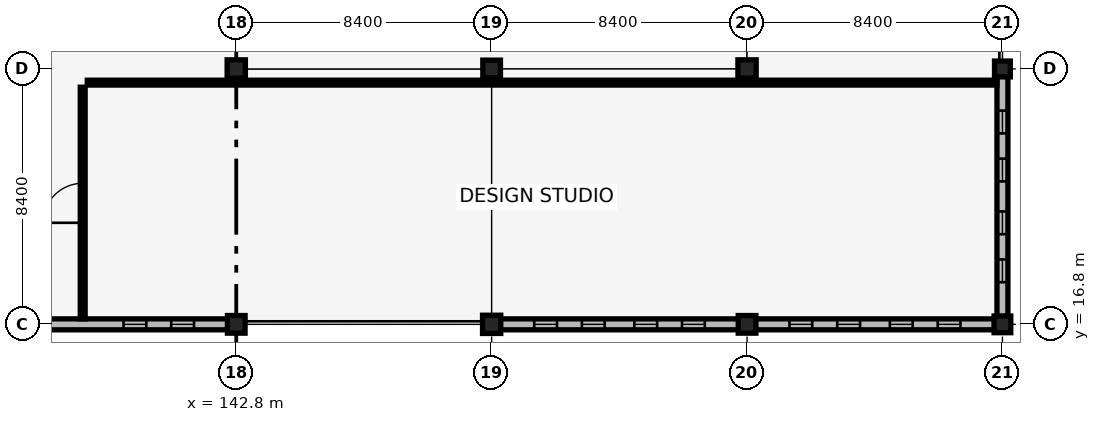
"""IFC4 building model, lengths in metres.
Left out: names, types, materials, properties, quantities, classifications, styles, units other than length and angle.
Written with IfcOpenShell. Run it as: python <this file> out.ifc"""

import sys

from ifc_helpers import new_model, si_unit, direction, frame, frame_2d, origin, origin_2d, place, context, subcontext, project, spatial, rectangle, extrude, element, fill, save


model = new_model("IFC4")
c1 = context("Model", 3, precision=1e-05, world=origin(), true_north=direction((0.0, 1.0)))
c2 = subcontext(c1, "Body", "Model", "MODEL_VIEW")
j1 = project(units=[si_unit("LENGTHUNIT", "METRE"), si_unit("PLANEANGLEUNIT", "RADIAN")], contexts=[c1])
p1 = place(None, origin())
s1 = spatial("IfcSite", under=j1, at=p1, CompositionType="ELEMENT")
p2 = place(p1, origin())
s2 = spatial("IfcBuilding", under=s1, at=p2, CompositionType="ELEMENT")
p3 = place(p2, frame((0.0, 0.0, 18.02)))
s3 = spatial("IfcBuildingStorey", under=s2, at=p3, CompositionType="ELEMENT", Elevation=18.02)
p4 = place(p3, frame((142.8, 16.8, 0.0), z_axis=(0.0, 0.0, 1.0), x_axis=(1.0, 0.0, 0.0)))
e1 = element("IfcColumn", 1, at=p4, inside=s3, PredefinedType="COLUMN", context=c2, shape_type="SweptSolid", body=[
    extrude(rectangle(XDim=0.58, YDim=0.58, at=origin_2d()), origin(), (0.0, 0.0, 1.0), 3.78),
])
for number, where, z_axis, x_axis in (
    (2, (142.8, 25.2, 0.0), (0.0, 0.0, 1.0), (1.0, 0.0, 0.0)),
    (3, (151.2, 16.8, 0.0), (0.0, 0.0, 1.0), (1.0, 0.0, 0.0)),
):
    element("IfcColumn", number, at=place(p3, frame(where, z_axis=z_axis, x_axis=x_axis)), inside=s3, PredefinedType="COLUMN", context=c2, shape_type="SweptSolid", body=[
        extrude(rectangle(XDim=0.6, YDim=0.6, at=origin_2d()), origin(), (0.0, 0.0, 1.0), 3.78),
    ])
for number, where, z_axis, x_axis in (
    (4, (151.2, 25.2, 0.0), (0.0, 0.0, 1.0), (1.0, 0.0, 0.0)),
    (5, (159.6, 16.8, 0.0), (0.0, 0.0, 1.0), (1.0, 0.0, 0.0)),
):
    element("IfcColumn", number, at=place(p3, frame(where, z_axis=z_axis, x_axis=x_axis)), inside=s3, PredefinedType="COLUMN", context=c2, shape_type="SweptSolid", body=[
        extrude(rectangle(XDim=0.58, YDim=0.58, at=origin_2d()), origin(), (0.0, 0.0, 1.0), 3.78),
    ])
p5 = place(p3, frame((159.6, 25.2, 0.0), z_axis=(0.0, 0.0, 1.0), x_axis=(1.0, 0.0, 0.0)))
e6 = element("IfcColumn", 6, at=p5, inside=s3, PredefinedType="COLUMN", context=c2, shape_type="SweptSolid", body=[
    extrude(rectangle(XDim=0.6, YDim=0.6, at=origin_2d()), origin(), (0.0, 0.0, 1.0), 3.78),
])
p6 = place(p3, frame((168.0, 16.8, 0.0), z_axis=(0.0, 0.0, 1.0), x_axis=(1.0, 0.0, 0.0)))
e7 = element("IfcColumn", 7, at=p6, inside=s3, PredefinedType="COLUMN", context=c2, shape_type="SweptSolid", body=[
    extrude(rectangle(XDim=0.55, YDim=0.55, at=origin_2d()), origin(), (0.0, 0.0, 1.0), 3.78),
])
p7 = place(p3, frame((168.0, 25.2, 0.0), z_axis=(0.0, 0.0, 1.0), x_axis=(1.0, 0.0, 0.0)))
e8 = element("IfcColumn", 8, at=p7, inside=s3, PredefinedType="COLUMN", context=c2, shape_type="SweptSolid", body=[
    extrude(rectangle(XDim=0.52, YDim=0.52, at=origin_2d()), origin(), (0.0, 0.0, 1.0), 3.78),
])
p8 = place(p3, frame((134.685, 16.8, 0.0), z_axis=(0.0, 0.0, 1.0), x_axis=(1.0, 0.0, 0.0)))
e9 = element("IfcWall", 9, at=p8, inside=s3, PredefinedType="SOLIDWALL", context=c2, shape_type="SweptSolid", body=[
    extrude(rectangle(XDim=7.84, YDim=0.36, at=frame_2d((3.92, 0.0))), origin(), (0.0, 0.0, 1.0), 3.18),
])
p9 = place(p8, frame((1.115, 0.0, 0.7)))
e10 = element("IfcOpeningElement", 10, at=p9, cuts=e9, PredefinedType="OPENING", context=c2, shape_type="SweptSolid", body=[
    extrude(rectangle(XDim=0.75, YDim=2.1, at=frame_2d((0.375, 1.05))), frame((0.0, 0.19, 0.0), z_axis=(0.0, -1.0, 0.0), x_axis=(1.0, 0.0, 0.0)), (0.0, 0.0, 1.0), 0.38),
])
p10 = place(p8, frame((4.407, 0.0, 0.7)))
e11 = element("IfcOpeningElement", 11, at=p10, cuts=e9, PredefinedType="OPENING", context=c2, shape_type="SweptSolid", body=[
    extrude(rectangle(XDim=0.75, YDim=2.1, at=frame_2d((0.375, 1.05))), frame((0.0, 0.19, 0.0), z_axis=(0.0, -1.0, 0.0), x_axis=(1.0, 0.0, 0.0)), (0.0, 0.0, 1.0), 0.38),
])
p11 = place(p8, frame((5.975, 0.0, 0.7)))
e12 = element("IfcOpeningElement", 12, at=p11, cuts=e9, PredefinedType="OPENING", context=c2, shape_type="SweptSolid", body=[
    extrude(rectangle(XDim=0.75, YDim=2.1, at=frame_2d((0.375, 1.05))), frame((0.0, 0.19, 0.0), z_axis=(0.0, -1.0, 0.0), x_axis=(1.0, 0.0, 0.0)), (0.0, 0.0, 1.0), 0.38),
])
p12 = place(p3, frame((151.485, 16.8, 0.0), z_axis=(0.0, 0.0, 1.0), x_axis=(1.0, 0.0, 0.0)))
e13 = element("IfcWall", 13, at=p12, inside=s3, PredefinedType="SOLIDWALL", context=c2, shape_type="SweptSolid", body=[
    extrude(rectangle(XDim=7.84, YDim=0.36, at=frame_2d((3.92, 0.0))), origin(), (0.0, 0.0, 1.0), 3.18),
])
p13 = place(p12, frame((1.115, 0.0, 0.7)))
e14 = element("IfcOpeningElement", 14, at=p13, cuts=e13, PredefinedType="OPENING", context=c2, shape_type="SweptSolid", body=[
    extrude(rectangle(XDim=0.75, YDim=2.1, at=frame_2d((0.375, 1.05))), frame((0.0, 0.19, 0.0), z_axis=(0.0, -1.0, 0.0), x_axis=(1.0, 0.0, 0.0)), (0.0, 0.0, 1.0), 0.38),
])
p14 = place(p12, frame((2.683, 0.0, 0.7)))
e15 = element("IfcOpeningElement", 15, at=p14, cuts=e13, PredefinedType="OPENING", context=c2, shape_type="SweptSolid", body=[
    extrude(rectangle(XDim=0.75, YDim=2.1, at=frame_2d((0.375, 1.05))), frame((0.0, 0.19, 0.0), z_axis=(0.0, -1.0, 0.0), x_axis=(1.0, 0.0, 0.0)), (0.0, 0.0, 1.0), 0.38),
])
p15 = place(p12, frame((4.407, 0.0, 0.7)))
e16 = element("IfcOpeningElement", 16, at=p15, cuts=e13, PredefinedType="OPENING", context=c2, shape_type="SweptSolid", body=[
    extrude(rectangle(XDim=0.75, YDim=2.1, at=frame_2d((0.375, 1.05))), frame((0.0, 0.19, 0.0), z_axis=(0.0, -1.0, 0.0), x_axis=(1.0, 0.0, 0.0)), (0.0, 0.0, 1.0), 0.38),
])
p16 = place(p12, frame((5.975, 0.0, 0.7)))
e17 = element("IfcOpeningElement", 17, at=p16, cuts=e13, PredefinedType="OPENING", context=c2, shape_type="SweptSolid", body=[
    extrude(rectangle(XDim=0.75, YDim=2.1, at=frame_2d((0.375, 1.05))), frame((0.0, 0.19, 0.0), z_axis=(0.0, -1.0, 0.0), x_axis=(1.0, 0.0, 0.0)), (0.0, 0.0, 1.0), 0.38),
])
p17 = place(p3, frame((159.875, 16.8, 0.0), z_axis=(0.0, 0.0, 1.0), x_axis=(1.0, 0.0, 0.0)))
e18 = element("IfcWall", 18, at=p17, inside=s3, PredefinedType="SOLIDWALL", context=c2, shape_type="SweptSolid", body=[
    extrude(rectangle(XDim=7.865, YDim=0.36, at=frame_2d((3.933, 0.0))), origin(), (0.0, 0.0, 1.0), 3.18),
])
p18 = place(p17, frame((1.119, 0.0, 0.7)))
e19 = element("IfcOpeningElement", 19, at=p18, cuts=e18, PredefinedType="OPENING", context=c2, shape_type="SweptSolid", body=[
    extrude(rectangle(XDim=0.75, YDim=2.1, at=frame_2d((0.375, 1.05))), frame((0.0, 0.19, 0.0), z_axis=(0.0, -1.0, 0.0), x_axis=(1.0, 0.0, 0.0)), (0.0, 0.0, 1.0), 0.38),
])
p19 = place(p17, frame((2.692, 0.0, 0.7)))
e20 = element("IfcOpeningElement", 20, at=p19, cuts=e18, PredefinedType="OPENING", context=c2, shape_type="SweptSolid", body=[
    extrude(rectangle(XDim=0.75, YDim=2.1, at=frame_2d((0.375, 1.05))), frame((0.0, 0.19, 0.0), z_axis=(0.0, -1.0, 0.0), x_axis=(1.0, 0.0, 0.0)), (0.0, 0.0, 1.0), 0.38),
])
p20 = place(p17, frame((4.423, 0.0, 0.7)))
e21 = element("IfcOpeningElement", 21, at=p20, cuts=e18, PredefinedType="OPENING", context=c2, shape_type="SweptSolid", body=[
    extrude(rectangle(XDim=0.75, YDim=2.1, at=frame_2d((0.375, 1.05))), frame((0.0, 0.19, 0.0), z_axis=(0.0, -1.0, 0.0), x_axis=(1.0, 0.0, 0.0)), (0.0, 0.0, 1.0), 0.38),
])
p21 = place(p17, frame((5.996, 0.0, 0.7)))
e22 = element("IfcOpeningElement", 22, at=p21, cuts=e18, PredefinedType="OPENING", context=c2, shape_type="SweptSolid", body=[
    extrude(rectangle(XDim=0.75, YDim=2.1, at=frame_2d((0.375, 1.05))), frame((0.0, 0.19, 0.0), z_axis=(0.0, -1.0, 0.0), x_axis=(1.0, 0.0, 0.0)), (0.0, 0.0, 1.0), 0.38),
])
p22 = place(p3, frame((168.0, 17.06, 0.0), z_axis=(0.0, 0.0, 1.0), x_axis=(0.0, 1.0, 0.0)))
e23 = element("IfcWall", 23, at=p22, inside=s3, PredefinedType="SOLIDWALL", context=c2, shape_type="SweptSolid", body=[
    extrude(rectangle(XDim=7.895, YDim=0.36, at=frame_2d((3.948, 0.0))), origin(), (0.0, 0.0, 1.0), 3.18),
])
p23 = place(p22, frame((1.125, 0.0, 0.7)))
e24 = element("IfcOpeningElement", 24, at=p23, cuts=e23, PredefinedType="OPENING", context=c2, shape_type="SweptSolid", body=[
    extrude(rectangle(XDim=0.75, YDim=2.1, at=frame_2d((0.375, 1.05))), frame((0.0, 0.19, 0.0), z_axis=(0.0, -1.0, 0.0), x_axis=(1.0, 0.0, 0.0)), (0.0, 0.0, 1.0), 0.38),
])
p24 = place(p22, frame((2.704, 0.0, 0.7)))
e25 = element("IfcOpeningElement", 25, at=p24, cuts=e23, PredefinedType="OPENING", context=c2, shape_type="SweptSolid", body=[
    extrude(rectangle(XDim=0.75, YDim=2.1, at=frame_2d((0.375, 1.05))), frame((0.0, 0.19, 0.0), z_axis=(0.0, -1.0, 0.0), x_axis=(1.0, 0.0, 0.0)), (0.0, 0.0, 1.0), 0.38),
])
p25 = place(p22, frame((4.441, 0.0, 0.7)))
e26 = element("IfcOpeningElement", 26, at=p25, cuts=e23, PredefinedType="OPENING", context=c2, shape_type="SweptSolid", body=[
    extrude(rectangle(XDim=0.75, YDim=2.1, at=frame_2d((0.375, 1.05))), frame((0.0, 0.19, 0.0), z_axis=(0.0, -1.0, 0.0), x_axis=(1.0, 0.0, 0.0)), (0.0, 0.0, 1.0), 0.38),
])
p26 = place(p22, frame((6.02, 0.0, 0.7)))
e27 = element("IfcOpeningElement", 27, at=p26, cuts=e23, PredefinedType="OPENING", context=c2, shape_type="SweptSolid", body=[
    extrude(rectangle(XDim=0.75, YDim=2.1, at=frame_2d((0.375, 1.05))), frame((0.0, 0.19, 0.0), z_axis=(0.0, -1.0, 0.0), x_axis=(1.0, 0.0, 0.0)), (0.0, 0.0, 1.0), 0.38),
])
p27 = place(p3, frame((137.75, 16.98, 0.0), z_axis=(0.0, 0.0, 1.0), x_axis=(0.0, 1.0, 0.0)))
e28 = element("IfcWall", 28, at=p27, inside=s3, PredefinedType="PARTITIONING", context=c2, shape_type="SweptSolid", body=[
    extrude(rectangle(XDim=7.62, YDim=0.16, at=frame_2d((3.81, 0.0))), origin(), (0.0, 0.0, 1.0), 3.18),
])
p28 = place(p27, frame((3.16, 0.0, 0.0)))
e29 = element("IfcOpeningElement", 29, at=p28, cuts=e28, PredefinedType="OPENING", context=c2, shape_type="SweptSolid", body=[
    extrude(rectangle(XDim=1.3, YDim=2.2, at=frame_2d((0.65, 1.1))), frame((0.0, 0.09, 0.0), z_axis=(0.0, -1.0, 0.0), x_axis=(1.0, 0.0, 0.0)), (0.0, 0.0, 1.0), 0.18),
])
p29 = place(p3, frame((137.9, 24.75, 0.0), z_axis=(0.0, 0.0, 1.0), x_axis=(1.0, 0.0, 0.0)))
e30 = element("IfcWall", 30, at=p29, inside=s3, PredefinedType="PARTITIONING", context=c2, shape_type="SweptSolid", body=[
    extrude(rectangle(XDim=29.92, YDim=0.16, at=frame_2d((14.96, 0.0))), origin(), (0.0, 0.0, 1.0), 3.13),
])
p30 = place(p10, origin())
e31 = element("IfcWindow", 31, at=p30, inside=s3, PartitioningType="DOUBLE_PANEL_VERTICAL", PredefinedType="WINDOW", context=c2, shape_type="SweptSolid", body=[
    extrude(rectangle(XDim=0.75, YDim=2.1, at=frame_2d((0.375, 1.05))), frame((0.0, 0.03, 0.0), z_axis=(0.0, -1.0, 0.0), x_axis=(1.0, 0.0, 0.0)), (0.0, 0.0, 1.0), 0.06),
])
fill(e11, e31)
p31 = place(p11, origin())
e32 = element("IfcWindow", 32, at=p31, inside=s3, PartitioningType="DOUBLE_PANEL_VERTICAL", PredefinedType="WINDOW", context=c2, shape_type="SweptSolid", body=[
    extrude(rectangle(XDim=0.75, YDim=2.1, at=frame_2d((0.375, 1.05))), frame((0.0, 0.03, 0.0), z_axis=(0.0, -1.0, 0.0), x_axis=(1.0, 0.0, 0.0)), (0.0, 0.0, 1.0), 0.06),
])
fill(e12, e32)
p32 = place(p13, origin())
e33 = element("IfcWindow", 33, at=p32, inside=s3, PartitioningType="DOUBLE_PANEL_VERTICAL", PredefinedType="WINDOW", context=c2, shape_type="SweptSolid", body=[
    extrude(rectangle(XDim=0.75, YDim=2.1, at=frame_2d((0.375, 1.05))), frame((0.0, 0.03, 0.0), z_axis=(0.0, -1.0, 0.0), x_axis=(1.0, 0.0, 0.0)), (0.0, 0.0, 1.0), 0.06),
])
fill(e14, e33)
p33 = place(p14, origin())
e34 = element("IfcWindow", 34, at=p33, inside=s3, PartitioningType="DOUBLE_PANEL_VERTICAL", PredefinedType="WINDOW", context=c2, shape_type="SweptSolid", body=[
    extrude(rectangle(XDim=0.75, YDim=2.1, at=frame_2d((0.375, 1.05))), frame((0.0, 0.03, 0.0), z_axis=(0.0, -1.0, 0.0), x_axis=(1.0, 0.0, 0.0)), (0.0, 0.0, 1.0), 0.06),
])
fill(e15, e34)
p34 = place(p15, origin())
e35 = element("IfcWindow", 35, at=p34, inside=s3, PartitioningType="DOUBLE_PANEL_VERTICAL", PredefinedType="WINDOW", context=c2, shape_type="SweptSolid", body=[
    extrude(rectangle(XDim=0.75, YDim=2.1, at=frame_2d((0.375, 1.05))), frame((0.0, 0.03, 0.0), z_axis=(0.0, -1.0, 0.0), x_axis=(1.0, 0.0, 0.0)), (0.0, 0.0, 1.0), 0.06),
])
fill(e16, e35)
p35 = place(p16, origin())
e36 = element("IfcWindow", 36, at=p35, inside=s3, PartitioningType="DOUBLE_PANEL_VERTICAL", PredefinedType="WINDOW", context=c2, shape_type="SweptSolid", body=[
    extrude(rectangle(XDim=0.75, YDim=2.1, at=frame_2d((0.375, 1.05))), frame((0.0, 0.03, 0.0), z_axis=(0.0, -1.0, 0.0), x_axis=(1.0, 0.0, 0.0)), (0.0, 0.0, 1.0), 0.06),
])
fill(e17, e36)
p36 = place(p18, origin())
e37 = element("IfcWindow", 37, at=p36, inside=s3, PartitioningType="DOUBLE_PANEL_VERTICAL", PredefinedType="WINDOW", context=c2, shape_type="SweptSolid", body=[
    extrude(rectangle(XDim=0.75, YDim=2.1, at=frame_2d((0.375, 1.05))), frame((0.0, 0.03, 0.0), z_axis=(0.0, -1.0, 0.0), x_axis=(1.0, 0.0, 0.0)), (0.0, 0.0, 1.0), 0.06),
])
fill(e19, e37)
p37 = place(p19, origin())
e38 = element("IfcWindow", 38, at=p37, inside=s3, PartitioningType="DOUBLE_PANEL_VERTICAL", PredefinedType="WINDOW", context=c2, shape_type="SweptSolid", body=[
    extrude(rectangle(XDim=0.75, YDim=2.1, at=frame_2d((0.375, 1.05))), frame((0.0, 0.03, 0.0), z_axis=(0.0, -1.0, 0.0), x_axis=(1.0, 0.0, 0.0)), (0.0, 0.0, 1.0), 0.06),
])
fill(e20, e38)
p38 = place(p20, origin())
e39 = element("IfcWindow", 39, at=p38, inside=s3, PartitioningType="DOUBLE_PANEL_VERTICAL", PredefinedType="WINDOW", context=c2, shape_type="SweptSolid", body=[
    extrude(rectangle(XDim=0.75, YDim=2.1, at=frame_2d((0.375, 1.05))), frame((0.0, 0.03, 0.0), z_axis=(0.0, -1.0, 0.0), x_axis=(1.0, 0.0, 0.0)), (0.0, 0.0, 1.0), 0.06),
])
fill(e21, e39)
p39 = place(p21, origin())
e40 = element("IfcWindow", 40, at=p39, inside=s3, PartitioningType="DOUBLE_PANEL_VERTICAL", PredefinedType="WINDOW", context=c2, shape_type="SweptSolid", body=[
    extrude(rectangle(XDim=0.75, YDim=2.1, at=frame_2d((0.375, 1.05))), frame((0.0, 0.03, 0.0), z_axis=(0.0, -1.0, 0.0), x_axis=(1.0, 0.0, 0.0)), (0.0, 0.0, 1.0), 0.06),
])
fill(e22, e40)
p40 = place(p23, origin())
e41 = element("IfcWindow", 41, at=p40, inside=s3, PartitioningType="DOUBLE_PANEL_VERTICAL", PredefinedType="WINDOW", context=c2, shape_type="SweptSolid", body=[
    extrude(rectangle(XDim=0.75, YDim=2.1, at=frame_2d((0.375, 1.05))), frame((0.0, 0.03, 0.0), z_axis=(0.0, -1.0, 0.0), x_axis=(1.0, 0.0, 0.0)), (0.0, 0.0, 1.0), 0.06),
])
fill(e24, e41)
p41 = place(p24, origin())
e42 = element("IfcWindow", 42, at=p41, inside=s3, PartitioningType="DOUBLE_PANEL_VERTICAL", PredefinedType="WINDOW", context=c2, shape_type="SweptSolid", body=[
    extrude(rectangle(XDim=0.75, YDim=2.1, at=frame_2d((0.375, 1.05))), frame((0.0, 0.03, 0.0), z_axis=(0.0, -1.0, 0.0), x_axis=(1.0, 0.0, 0.0)), (0.0, 0.0, 1.0), 0.06),
])
fill(e25, e42)
p42 = place(p25, origin())
e43 = element("IfcWindow", 43, at=p42, inside=s3, PartitioningType="DOUBLE_PANEL_VERTICAL", PredefinedType="WINDOW", context=c2, shape_type="SweptSolid", body=[
    extrude(rectangle(XDim=0.75, YDim=2.1, at=frame_2d((0.375, 1.05))), frame((0.0, 0.03, 0.0), z_axis=(0.0, -1.0, 0.0), x_axis=(1.0, 0.0, 0.0)), (0.0, 0.0, 1.0), 0.06),
])
fill(e26, e43)
p43 = place(p26, origin())
e44 = element("IfcWindow", 44, at=p43, inside=s3, PartitioningType="DOUBLE_PANEL_VERTICAL", PredefinedType="WINDOW", context=c2, shape_type="SweptSolid", body=[
    extrude(rectangle(XDim=0.75, YDim=2.1, at=frame_2d((0.375, 1.05))), frame((0.0, 0.03, 0.0), z_axis=(0.0, -1.0, 0.0), x_axis=(1.0, 0.0, 0.0)), (0.0, 0.0, 1.0), 0.06),
])
fill(e27, e44)
p44 = place(p28, origin())
e45 = element("IfcDoor", 45, at=p44, inside=s3, OperationType="SINGLE_SWING_LEFT", PredefinedType="DOOR", context=c2, shape_type="SweptSolid", body=[
    extrude(rectangle(XDim=1.3, YDim=2.2, at=frame_2d((0.65, 1.1))), frame((0.0, 0.025, 0.0), z_axis=(0.0, -1.0, 0.0), x_axis=(1.0, 0.0, 0.0)), (0.0, 0.0, 1.0), 0.05),
])
fill(e29, e45)
save(model, sys.argv[1])
